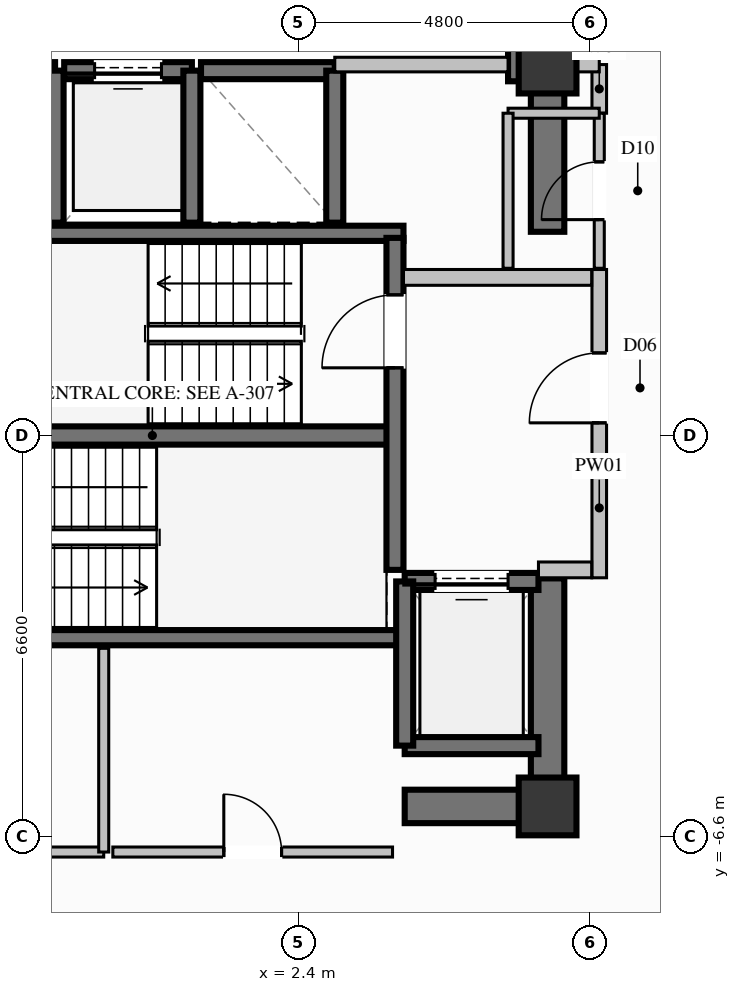
"""IFC4 building model, lengths in metres.
Left out: names, types, materials, properties, quantities, classifications, styles, units other than length and angle.
Written with IfcOpenShell. Run it as: python <this file> out.ifc"""

import sys

from ifc_helpers import new_model, si_unit, direction, frame, frame_2d, origin, origin_2d, place, context, subcontext, project, spatial, rectangle, extrude, element, fill, save


model = new_model("IFC4")
c1 = context("Model", 3, precision=1e-05, world=origin(), true_north=direction((0.0, 1.0)))
c2 = subcontext(c1, "Body", "Model", "MODEL_VIEW")
j1 = project(units=[si_unit("LENGTHUNIT", "METRE"), si_unit("PLANEANGLEUNIT", "RADIAN")], contexts=[c1])
p1 = place(None, origin())
s1 = spatial("IfcSite", under=j1, at=p1, CompositionType="ELEMENT")
p2 = place(p1, origin())
s2 = spatial("IfcBuilding", under=s1, at=p2, CompositionType="ELEMENT")
p3 = place(p2, frame((0.0, 0.0, 191.2)))
s3 = spatial("IfcBuildingStorey", under=s2, at=p3, CompositionType="ELEMENT", Elevation=191.2)
for number, where, z_axis, x_axis in (
    (1, (6.5, -6.1, 0.0), (0.0, 0.0, 1.0), (1.0, 0.0, 0.0)),
    (2, (6.5, 6.1, 0.0), (0.0, 0.0, 1.0), (1.0, 0.0, 0.0)),
):
    element("IfcColumn", number, at=place(p3, frame(where, z_axis=z_axis, x_axis=x_axis)), inside=s3, PredefinedType="COLUMN", context=c2, shape_type="SweptSolid", body=[
        extrude(rectangle(XDim=0.95, YDim=0.95, at=origin_2d()), origin(), (0.0, 0.0, 1.0), 3.6),
    ])
p4 = place(p3, frame((-3.99, 0.0, 0.0), z_axis=(0.0, 0.0, 1.0), x_axis=(1.0, 0.0, 0.0)))
e3 = element("IfcWall", 3, at=p4, inside=s3, PredefinedType="SHEAR", context=c2, shape_type="SweptSolid", body=[
    extrude(rectangle(XDim=7.98, YDim=0.3, at=frame_2d((3.99, 0.0))), origin(), (0.0, 0.0, 1.0), 3.6),
])
for number, where, z_axis, x_axis in (
    (4, (-4.13, -3.325, 0.0), (0.0, 0.0, 1.0), (1.0, 0.0, 0.0)),
    (5, (-4.13, 3.325, 0.0), (0.0, 0.0, 1.0), (1.0, 0.0, 0.0)),
):
    element("IfcWall", number, at=place(p3, frame(where, z_axis=z_axis, x_axis=x_axis)), inside=s3, PredefinedType="SOLIDWALL", context=c2, shape_type="SweptSolid", body=[
        extrude(rectangle(XDim=8.26, YDim=0.25, at=frame_2d((4.13, 0.0))), origin(), (0.0, 0.0, 1.0), 3.6),
    ])
p5 = place(p3, frame((4.15, -6.1, 0.0), z_axis=(0.0, 0.0, 1.0), x_axis=(1.0, 0.0, 0.0)))
e6 = element("IfcWall", 6, at=p5, inside=s3, PredefinedType="SHEAR", context=c2, shape_type="SweptSolid", body=[
    extrude(rectangle(XDim=2.075, YDim=0.55, at=frame_2d((1.038, 0.0))), origin(), (0.0, 0.0, 1.0), 3.6),
])
p6 = place(p3, frame((5.85, 6.1, 0.0), z_axis=(0.0, 0.0, 1.0), x_axis=(1.0, 0.0, 0.0)))
e7 = element("IfcWall", 7, at=p6, inside=s3, PredefinedType="SHEAR", context=c2, shape_type="SweptSolid", body=[
    extrude(rectangle(XDim=0.375, YDim=0.55, at=frame_2d((0.188, 0.0))), origin(), (0.0, 0.0, 1.0), 3.6),
])
p7 = place(p3, frame((6.5, -6.375, 0.0), z_axis=(0.0, 0.0, 1.0), x_axis=(0.0, 1.0, 0.0)))
e8 = element("IfcWall", 8, at=p7, inside=s3, PredefinedType="SHEAR", context=c2, shape_type="SweptSolid", body=[
    extrude(rectangle(XDim=4.025, YDim=0.55, at=frame_2d((2.012, 0.0))), origin(), (0.0, 0.0, 1.0), 3.6),
])
p8 = place(p3, frame((6.5, 3.35, 0.0), z_axis=(0.0, 0.0, 1.0), x_axis=(0.0, 1.0, 0.0)))
e9 = element("IfcWall", 9, at=p8, inside=s3, PredefinedType="SHEAR", context=c2, shape_type="SweptSolid", body=[
    extrude(rectangle(XDim=3.025, YDim=0.55, at=frame_2d((1.512, 0.0))), origin(), (0.0, 0.0, 1.0), 3.6),
])
p9 = place(p3, frame((-1.6, 6.0, 0.0), z_axis=(0.0, 0.0, 1.0), x_axis=(-1.0, 0.0, 0.0)))
e10 = element("IfcWall", 10, at=p9, inside=s3, PredefinedType="SOLIDWALL", context=c2, shape_type="SweptSolid", body=[
    extrude(rectangle(XDim=2.1, YDim=0.28, at=frame_2d((1.05, 0.0))), origin(), (0.0, 0.0, 1.0), 3.36),
])
p10 = place(p9, frame((0.5, 0.0, 0.0)))
e11 = element("IfcOpeningElement", 11, at=p10, cuts=e10, PredefinedType="OPENING", context=c2, shape_type="SweptSolid", body=[
    extrude(rectangle(XDim=1.1, YDim=2.2, at=frame_2d((0.55, 1.1))), frame((0.0, 0.15, 0.0), z_axis=(0.0, -1.0, 0.0), x_axis=(1.0, 0.0, 0.0)), (0.0, 0.0, 1.0), 0.3),
])
p11 = place(p3, frame((-1.6, 3.5, 0.0), z_axis=(0.0, 0.0, 1.0), x_axis=(0.0, 1.0, 0.0)))
e12 = element("IfcWall", 12, at=p11, inside=s3, PredefinedType="SOLIDWALL", context=c2, shape_type="SweptSolid", body=[
    extrude(rectangle(XDim=2.5, YDim=0.28, at=frame_2d((1.25, 0.0))), origin(), (0.0, 0.0, 1.0), 3.36),
])
p12 = place(p3, frame((0.65, 6.0, 0.0), z_axis=(0.0, 0.0, 1.0), x_axis=(-1.0, 0.0, 0.0)))
e13 = element("IfcWall", 13, at=p12, inside=s3, PredefinedType="SOLIDWALL", context=c2, shape_type="SweptSolid", body=[
    extrude(rectangle(XDim=2.1, YDim=0.28, at=frame_2d((1.05, 0.0))), origin(), (0.0, 0.0, 1.0), 3.36),
])
p13 = place(p12, frame((0.5, 0.0, 0.0)))
e14 = element("IfcOpeningElement", 14, at=p13, cuts=e13, PredefinedType="OPENING", context=c2, shape_type="SweptSolid", body=[
    extrude(rectangle(XDim=1.1, YDim=2.2, at=frame_2d((0.55, 1.1))), frame((0.0, 0.15, 0.0), z_axis=(0.0, -1.0, 0.0), x_axis=(1.0, 0.0, 0.0)), (0.0, 0.0, 1.0), 0.3),
])
p14 = place(p3, frame((0.65, 3.5, 0.0), z_axis=(0.0, 0.0, 1.0), x_axis=(0.0, 1.0, 0.0)))
e15 = element("IfcWall", 15, at=p14, inside=s3, PredefinedType="SOLIDWALL", context=c2, shape_type="SweptSolid", body=[
    extrude(rectangle(XDim=2.5, YDim=0.28, at=frame_2d((1.25, 0.0))), origin(), (0.0, 0.0, 1.0), 3.36),
])
p15 = place(p3, frame((3.0, 6.0, 0.0), z_axis=(0.0, 0.0, 1.0), x_axis=(-1.0, 0.0, 0.0)))
e16 = element("IfcWall", 16, at=p15, inside=s3, PredefinedType="SOLIDWALL", context=c2, shape_type="SweptSolid", body=[
    extrude(rectangle(XDim=2.2, YDim=0.28, at=frame_2d((1.1, 0.0))), origin(), (0.0, 0.0, 1.0), 3.36),
])
p16 = place(p3, frame((3.0, 3.5, 0.0), z_axis=(0.0, 0.0, 1.0), x_axis=(0.0, 1.0, 0.0)))
e17 = element("IfcWall", 17, at=p16, inside=s3, PredefinedType="SOLIDWALL", context=c2, shape_type="SweptSolid", body=[
    extrude(rectangle(XDim=2.5, YDim=0.28, at=frame_2d((1.25, 0.0))), origin(), (0.0, 0.0, 1.0), 3.36),
])
p17 = place(p3, frame((4.15, -5.1, 0.0), z_axis=(0.0, 0.0, 1.0), x_axis=(1.0, 0.0, 0.0)))
e18 = element("IfcWall", 18, at=p17, inside=s3, PredefinedType="SOLIDWALL", context=c2, shape_type="SweptSolid", body=[
    extrude(rectangle(XDim=2.2, YDim=0.28, at=frame_2d((1.1, 0.0))), origin(), (0.0, 0.0, 1.0), 3.36),
])
p18 = place(p3, frame((6.35, -2.4, 0.0), z_axis=(0.0, 0.0, 1.0), x_axis=(-1.0, 0.0, 0.0)))
e19 = element("IfcWall", 19, at=p18, inside=s3, PredefinedType="SOLIDWALL", context=c2, shape_type="SweptSolid", body=[
    extrude(rectangle(XDim=2.2, YDim=0.28, at=frame_2d((1.1, 0.0))), origin(), (0.0, 0.0, 1.0), 3.36),
])
p19 = place(p18, frame((0.5, 0.0, 0.0)))
e20 = element("IfcOpeningElement", 20, at=p19, cuts=e19, PredefinedType="OPENING", context=c2, shape_type="SweptSolid", body=[
    extrude(rectangle(XDim=1.2, YDim=2.2, at=frame_2d((0.6, 1.1))), frame((0.0, 0.15, 0.0), z_axis=(0.0, -1.0, 0.0), x_axis=(1.0, 0.0, 0.0)), (0.0, 0.0, 1.0), 0.3),
])
p20 = place(p3, frame((4.15, -2.4, 0.0), z_axis=(0.0, 0.0, 1.0), x_axis=(0.0, -1.0, 0.0)))
e21 = element("IfcWall", 21, at=p20, inside=s3, PredefinedType="SOLIDWALL", context=c2, shape_type="SweptSolid", body=[
    extrude(rectangle(XDim=2.7, YDim=0.28, at=frame_2d((1.35, 0.0))), origin(), (0.0, 0.0, 1.0), 3.36),
])
p21 = place(p3, frame((3.99, -2.21, 0.0), z_axis=(0.0, 0.0, 1.0), x_axis=(0.0, 1.0, 0.0)))
e22 = element("IfcWall", 22, at=p21, inside=s3, PredefinedType="SOLIDWALL", context=c2, shape_type="SweptSolid", body=[
    extrude(rectangle(XDim=5.46, YDim=0.28, at=frame_2d((2.73, 0.0))), origin(), (0.0, 0.0, 1.0), 3.36),
])
p22 = place(p21, frame((3.323, 0.0, 0.0)))
e23 = element("IfcOpeningElement", 23, at=p22, cuts=e22, PredefinedType="OPENING", context=c2, shape_type="SweptSolid", body=[
    extrude(rectangle(XDim=1.2, YDim=2.2, at=frame_2d((0.6, 1.1))), frame((0.0, 0.15, 0.0), z_axis=(0.0, -1.0, 0.0), x_axis=(1.0, 0.0, 0.0)), (0.0, 0.0, 1.0), 0.3),
])
p23 = place(p3, frame((7.35, -2.34, 0.0), z_axis=(0.0, 0.0, 1.0), x_axis=(0.0, 1.0, 0.0)))
e24 = element("IfcWall", 24, at=p23, inside=s3, PredefinedType="PARTITIONING", context=c2, shape_type="SweptSolid", body=[
    extrude(rectangle(XDim=5.07, YDim=0.24, at=frame_2d((2.535, 0.0))), origin(), (0.0, 0.0, 1.0), 2.445),
])
p24 = place(p23, frame((2.548, 0.0, 0.0)))
e25 = element("IfcOpeningElement", 25, at=p24, cuts=e24, PredefinedType="OPENING", context=c2, shape_type="SweptSolid", body=[
    extrude(rectangle(XDim=1.15, YDim=2.2, at=frame_2d((0.575, 1.1))), frame((0.0, 0.13, 0.0), z_axis=(0.0, -1.0, 0.0), x_axis=(1.0, 0.0, 0.0)), (0.0, 0.0, 1.0), 0.26),
])
p25 = place(p3, frame((6.35, -2.21, 0.0), z_axis=(0.0, 0.0, 1.0), x_axis=(1.0, 0.0, 0.0)))
e26 = element("IfcWall", 26, at=p25, inside=s3, PredefinedType="PARTITIONING", context=c2, shape_type="SweptSolid", body=[
    extrude(rectangle(XDim=0.875, YDim=0.26, at=frame_2d((0.438, 0.0))), origin(), (0.0, 0.0, 1.0), 3.36),
])
p26 = place(p3, frame((4.13, 2.6, 0.0), z_axis=(0.0, 0.0, 1.0), x_axis=(1.0, 0.0, 0.0)))
e27 = element("IfcWall", 27, at=p26, inside=s3, PredefinedType="PARTITIONING", context=c2, shape_type="SweptSolid", body=[
    extrude(rectangle(XDim=3.095, YDim=0.26, at=frame_2d((1.548, 0.0))), origin(), (0.0, 0.0, 1.0), 3.36),
])
p27 = place(p3, frame((3.0, 6.1, 0.0), z_axis=(0.0, 0.0, 1.0), x_axis=(1.0, 0.0, 0.0)))
e28 = element("IfcWall", 28, at=p27, inside=s3, PredefinedType="PARTITIONING", context=c2, shape_type="SweptSolid", body=[
    extrude(rectangle(XDim=2.85, YDim=0.24, at=frame_2d((1.425, 0.0))), origin(), (0.0, 0.0, 1.0), 2.445),
])
p28 = place(p3, frame((7.35, 5.3, 0.0), z_axis=(0.0, 0.0, 1.0), x_axis=(0.0, 1.0, 0.0)))
e29 = element("IfcWall", 29, at=p28, inside=s3, PredefinedType="PARTITIONING", context=c2, shape_type="SweptSolid", body=[
    extrude(rectangle(XDim=0.8, YDim=0.24, at=frame_2d((0.4, 0.0))), origin(), (0.0, 0.0, 1.0), 2.445),
])
p29 = place(p3, frame((6.5, 6.1, 0.0), z_axis=(0.0, 0.0, 1.0), x_axis=(1.0, 0.0, 0.0)))
e30 = element("IfcWall", 30, at=p29, inside=s3, PredefinedType="PARTITIONING", context=c2, shape_type="SweptSolid", body=[
    extrude(rectangle(XDim=0.85, YDim=0.24, at=frame_2d((0.425, 0.0))), origin(), (0.0, 0.0, 1.0), 2.876),
])
p30 = place(p3, frame((7.35, 2.75, 0.0), z_axis=(0.0, 0.0, 1.0), x_axis=(0.0, 1.0, 0.0)))
e31 = element("IfcWall", 31, at=p30, inside=s3, PredefinedType="PARTITIONING", context=c2, shape_type="SweptSolid", body=[
    extrude(rectangle(XDim=2.55, YDim=0.165, at=frame_2d((1.275, 0.0))), origin(), (0.0, 0.0, 1.0), 3.36),
])
p31 = place(p30, frame((0.8, 0.0, 0.0)))
e32 = element("IfcOpeningElement", 32, at=p31, cuts=e31, PredefinedType="OPENING", context=c2, shape_type="SweptSolid", body=[
    extrude(rectangle(XDim=0.95, YDim=2.1, at=frame_2d((0.475, 1.05))), frame((0.0, 0.093, 0.0), z_axis=(0.0, -1.0, 0.0), x_axis=(1.0, 0.0, 0.0)), (0.0, 0.0, 1.0), 0.185),
])
p32 = place(p3, frame((7.35, 5.3, 0.0), z_axis=(0.0, 0.0, 1.0), x_axis=(-1.0, 0.0, 0.0)))
e33 = element("IfcWall", 33, at=p32, inside=s3, PredefinedType="PARTITIONING", context=c2, shape_type="SweptSolid", body=[
    extrude(rectangle(XDim=1.5, YDim=0.165, at=frame_2d((0.75, 0.0))), origin(), (0.0, 0.0, 1.0), 2.445),
])
p33 = place(p3, frame((5.85, 5.3, 0.0), z_axis=(0.0, 0.0, 1.0), x_axis=(0.0, -1.0, 0.0)))
e34 = element("IfcWall", 34, at=p33, inside=s3, PredefinedType="PARTITIONING", context=c2, shape_type="SweptSolid", body=[
    extrude(rectangle(XDim=2.55, YDim=0.165, at=frame_2d((1.275, 0.0))), origin(), (0.0, 0.0, 1.0), 2.445),
])
p34 = place(p3, frame((-5.7, -6.85, 0.0), z_axis=(0.0, 0.0, 1.0), x_axis=(1.0, 0.0, 0.0)))
e35 = element("IfcWall", 35, at=p34, inside=s3, PredefinedType="PARTITIONING", context=c2, shape_type="SweptSolid", body=[
    extrude(rectangle(XDim=4.9, YDim=0.165, at=frame_2d((2.45, 0.0))), origin(), (0.0, 0.0, 1.0), 2.445),
])
p35 = place(p34, frame((1.975, 0.0, 0.0)))
e36 = element("IfcOpeningElement", 36, at=p35, cuts=e35, PredefinedType="OPENING", context=c2, shape_type="SweptSolid", body=[
    extrude(rectangle(XDim=0.95, YDim=2.1, at=frame_2d((0.475, 1.05))), frame((0.0, 0.093, 0.0), z_axis=(0.0, -1.0, 0.0), x_axis=(1.0, 0.0, 0.0)), (0.0, 0.0, 1.0), 0.185),
])
p36 = place(p3, frame((-0.8, -6.85, 0.0), z_axis=(0.0, 0.0, 1.0), x_axis=(0.0, 1.0, 0.0)))
e37 = element("IfcWall", 37, at=p36, inside=s3, PredefinedType="PARTITIONING", context=c2, shape_type="SweptSolid", body=[
    extrude(rectangle(XDim=3.35, YDim=0.165, at=frame_2d((1.675, 0.0))), origin(), (0.0, 0.0, 1.0), 3.36),
])
p37 = place(p3, frame((-0.65, -6.85, 0.0), z_axis=(0.0, 0.0, 1.0), x_axis=(1.0, 0.0, 0.0)))
e38 = element("IfcWall", 38, at=p37, inside=s3, PredefinedType="PARTITIONING", context=c2, shape_type="SweptSolid", body=[
    extrude(rectangle(XDim=4.6, YDim=0.165, at=frame_2d((2.3, 0.0))), origin(), (0.0, 0.0, 1.0), 2.445),
])
p38 = place(p37, frame((1.825, 0.0, 0.0)))
e39 = element("IfcOpeningElement", 39, at=p38, cuts=e38, PredefinedType="OPENING", context=c2, shape_type="SweptSolid", body=[
    extrude(rectangle(XDim=0.95, YDim=2.1, at=frame_2d((0.475, 1.05))), frame((0.0, 0.093, 0.0), z_axis=(0.0, -1.0, 0.0), x_axis=(1.0, 0.0, 0.0)), (0.0, 0.0, 1.0), 0.185),
])
p39 = place(p13, origin())
e40 = element("IfcDoor", 40, at=p39, inside=s3, OperationType="SLIDING_TO_LEFT", PredefinedType="DOOR", context=c2, shape_type="SweptSolid", body=[
    extrude(rectangle(XDim=1.1, YDim=2.2, at=frame_2d((0.55, 1.1))), frame((0.0, 0.025, 0.0), z_axis=(0.0, -1.0, 0.0), x_axis=(1.0, 0.0, 0.0)), (0.0, 0.0, 1.0), 0.05),
])
fill(e14, e40)
p40 = place(p19, origin())
e41 = element("IfcDoor", 41, at=p40, inside=s3, OperationType="SLIDING_TO_LEFT", PredefinedType="DOOR", context=c2, shape_type="SweptSolid", body=[
    extrude(rectangle(XDim=1.2, YDim=2.2, at=frame_2d((0.6, 1.1))), frame((0.0, 0.025, 0.0), z_axis=(0.0, -1.0, 0.0), x_axis=(1.0, 0.0, 0.0)), (0.0, 0.0, 1.0), 0.05),
])
fill(e20, e41)
p41 = place(p22, origin())
e42 = element("IfcDoor", 42, at=p41, inside=s3, OperationType="SINGLE_SWING_LEFT", PredefinedType="DOOR", context=c2, shape_type="SweptSolid", body=[
    extrude(rectangle(XDim=1.2, YDim=2.2, at=frame_2d((0.6, 1.1))), frame((0.0, 0.025, 0.0), z_axis=(0.0, -1.0, 0.0), x_axis=(1.0, 0.0, 0.0)), (0.0, 0.0, 1.0), 0.05),
])
fill(e23, e42)
p42 = place(p24, origin())
e43 = element("IfcDoor", 43, at=p42, inside=s3, OperationType="SINGLE_SWING_LEFT", PredefinedType="DOOR", context=c2, shape_type="SweptSolid", body=[
    extrude(rectangle(XDim=1.15, YDim=2.2, at=frame_2d((0.575, 1.1))), frame((0.0, 0.025, 0.0), z_axis=(0.0, -1.0, 0.0), x_axis=(1.0, 0.0, 0.0)), (0.0, 0.0, 1.0), 0.05),
])
fill(e25, e43)
p43 = place(p31, origin())
e44 = element("IfcDoor", 44, at=p43, inside=s3, OperationType="SINGLE_SWING_LEFT", PredefinedType="DOOR", context=c2, shape_type="SweptSolid", body=[
    extrude(rectangle(XDim=0.95, YDim=2.1, at=frame_2d((0.475, 1.05))), frame((0.0, 0.025, 0.0), z_axis=(0.0, -1.0, 0.0), x_axis=(1.0, 0.0, 0.0)), (0.0, 0.0, 1.0), 0.05),
])
fill(e32, e44)
p44 = place(p38, origin())
e45 = element("IfcDoor", 45, at=p44, inside=s3, OperationType="SINGLE_SWING_LEFT", PredefinedType="DOOR", context=c2, shape_type="SweptSolid", body=[
    extrude(rectangle(XDim=0.95, YDim=2.1, at=frame_2d((0.475, 1.05))), frame((0.0, 0.025, 0.0), z_axis=(0.0, -1.0, 0.0), x_axis=(1.0, 0.0, 0.0)), (0.0, 0.0, 1.0), 0.05),
])
fill(e39, e45)
save(model, sys.argv[1])
